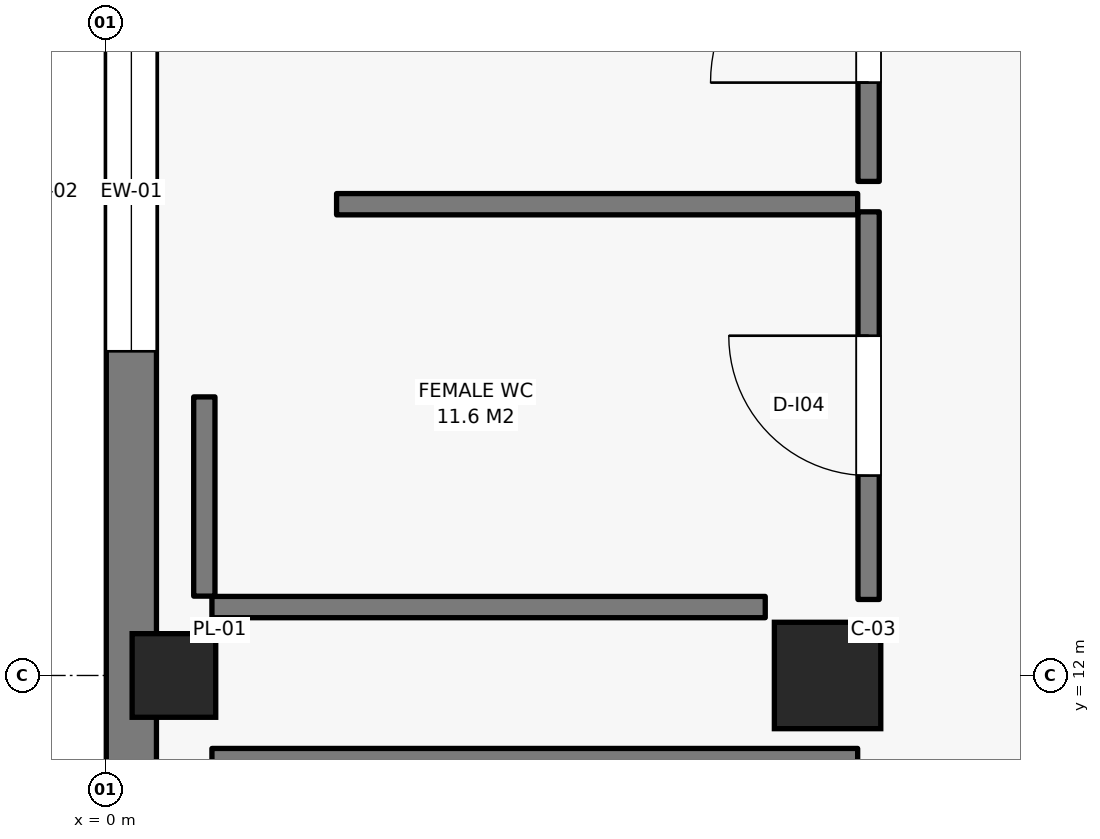
"""IFC4 building model, lengths in metres.
Left out: names, types, materials, properties, quantities, classifications, styles, units other than length and angle.
Written with IfcOpenShell. Run it as: python <this file> out.ifc"""

import sys

from ifc_helpers import new_model, si_unit, direction, frame, frame_2d, origin, origin_2d, place, context, subcontext, project, spatial, rectangle, extrude, element, fill, save


model = new_model("IFC4")
c1 = context("Model", 3, precision=1e-05, world=origin(), true_north=direction((0.0, 1.0)))
c2 = subcontext(c1, "Body", "Model", "MODEL_VIEW")
j1 = project(units=[si_unit("LENGTHUNIT", "METRE"), si_unit("PLANEANGLEUNIT", "RADIAN")], contexts=[c1])
p1 = place(None, origin())
s1 = spatial("IfcSite", under=j1, at=p1, CompositionType="ELEMENT")
p2 = place(p1, origin())
s2 = spatial("IfcBuilding", under=s1, at=p2, CompositionType="ELEMENT")
p3 = place(p2, origin())
s3 = spatial("IfcBuildingStorey", under=s2, at=p3, CompositionType="ELEMENT", Elevation=0.0)
p4 = place(p3, frame((0.45, 12.0, -0.4), z_axis=(0.0, 0.0, 1.0), x_axis=(1.0, 0.0, 0.0)))
e1 = element("IfcColumn", 1, at=p4, inside=s3, PredefinedType="PILASTER", context=c2, shape_type="SweptSolid", body=[
    extrude(rectangle(XDim=0.55, YDim=0.55, at=origin_2d()), origin(), (0.0, 0.0, 1.0), 6.4),
])
p5 = place(p3, frame((4.75, 12.0, -0.4), z_axis=(0.0, 0.0, 1.0), x_axis=(1.0, 0.0, 0.0)))
e2 = element("IfcColumn", 2, at=p5, inside=s3, PredefinedType="COLUMN", context=c2, shape_type="SweptSolid", body=[
    extrude(rectangle(XDim=0.7, YDim=0.7, at=origin_2d()), origin(), (0.0, 0.0, 1.0), 6.4),
])
p6 = place(p3, frame((0.17, 30.0, 0.0), z_axis=(0.0, 0.0, 1.0), x_axis=(0.0, -1.0, 0.0)))
e3 = element("IfcWall", 3, at=p6, inside=s3, PredefinedType="SOLIDWALL", context=c2, shape_type="SweptSolid", body=[
    extrude(rectangle(XDim=29.635, YDim=0.33, at=frame_2d((14.817, 0.0))), origin(), (0.0, 0.0, 1.0), 5.385),
])
p7 = place(p6, frame((1.067, 0.0, 0.82)))
e4 = element("IfcOpeningElement", 4, at=p7, cuts=e3, PredefinedType="OPENING", context=c2, shape_type="SweptSolid", body=[
    extrude(rectangle(XDim=2.1, YDim=2.55, at=frame_2d((1.05, 1.275))), frame((0.0, 0.175, 0.0), z_axis=(0.0, -1.0, 0.0), x_axis=(1.0, 0.0, 0.0)), (0.0, 0.0, 1.0), 0.35),
])
p8 = place(p6, frame((13.768, 0.0, 0.82)))
e5 = element("IfcOpeningElement", 5, at=p8, cuts=e3, PredefinedType="OPENING", context=c2, shape_type="SweptSolid", body=[
    extrude(rectangle(XDim=2.1, YDim=2.55, at=frame_2d((1.05, 1.275))), frame((0.0, 0.175, 0.0), z_axis=(0.0, -1.0, 0.0), x_axis=(1.0, 0.0, 0.0)), (0.0, 0.0, 1.0), 0.35),
])
p9 = place(p6, frame((26.468, 0.0, 0.82)))
e6 = element("IfcOpeningElement", 6, at=p9, cuts=e3, PredefinedType="OPENING", context=c2, shape_type="SweptSolid", body=[
    extrude(rectangle(XDim=2.1, YDim=2.55, at=frame_2d((1.05, 1.275))), frame((0.0, 0.175, 0.0), z_axis=(0.0, -1.0, 0.0), x_axis=(1.0, 0.0, 0.0)), (0.0, 0.0, 1.0), 0.35),
])
p10 = place(p3, frame((4.948, 11.45, 0.0), z_axis=(0.0, 0.0, 1.0), x_axis=(-1.0, 0.0, 0.0)))
e7 = element("IfcWall", 7, at=p10, inside=s3, PredefinedType="PARTITIONING", context=c2, shape_type="SweptSolid", body=[
    extrude(rectangle(XDim=4.248, YDim=0.14, at=frame_2d((2.124, 0.0))), origin(), (0.0, 0.0, 1.0), 5.345),
])
p11 = place(p3, frame((0.7, 12.45, 0.0), z_axis=(0.0, 0.0, 1.0), x_axis=(1.0, 0.0, 0.0)))
e8 = element("IfcWall", 8, at=p11, inside=s3, PredefinedType="PARTITIONING", context=c2, shape_type="SweptSolid", body=[
    extrude(rectangle(XDim=3.64, YDim=0.14, at=frame_2d((1.82, 0.0))), origin(), (0.0, 0.0, 1.0), 5.385),
])
p12 = place(p3, frame((5.02, 12.5, 0.0), z_axis=(0.0, 0.0, 1.0), x_axis=(0.0, 1.0, 0.0)))
e9 = element("IfcWall", 9, at=p12, inside=s3, PredefinedType="PARTITIONING", context=c2, shape_type="SweptSolid", body=[
    extrude(rectangle(XDim=2.55, YDim=0.14, at=frame_2d((1.275, 0.0))), origin(), (0.0, 0.0, 1.0), 5.345),
])
p13 = place(p12, frame((0.815, 0.0, 0.0)))
e10 = element("IfcOpeningElement", 10, at=p13, cuts=e9, PredefinedType="OPENING", context=c2, shape_type="SweptSolid", body=[
    extrude(rectangle(XDim=0.92, YDim=2.08, at=frame_2d((0.46, 1.04))), frame((0.0, 0.08, 0.0), z_axis=(0.0, -1.0, 0.0), x_axis=(1.0, 0.0, 0.0)), (0.0, 0.0, 1.0), 0.16),
])
p14 = place(p3, frame((4.948, 15.1, 0.0), z_axis=(0.0, 0.0, 1.0), x_axis=(-1.0, 0.0, 0.0)))
e11 = element("IfcWall", 11, at=p14, inside=s3, PredefinedType="PARTITIONING", context=c2, shape_type="SweptSolid", body=[
    extrude(rectangle(XDim=3.428, YDim=0.14, at=frame_2d((1.714, 0.0))), origin(), (0.0, 0.0, 1.0), 5.345),
])
p15 = place(p3, frame((0.65, 13.833, 0.0), z_axis=(0.0, 0.0, 1.0), x_axis=(0.0, -1.0, 0.0)))
e12 = element("IfcWall", 12, at=p15, inside=s3, PredefinedType="PARTITIONING", context=c2, shape_type="SweptSolid", body=[
    extrude(rectangle(XDim=1.311, YDim=0.14, at=frame_2d((0.655, 0.0))), origin(), (0.0, 0.0, 1.0), 5.385),
])
p16 = place(p3, frame((5.02, 15.25, 0.0), z_axis=(0.0, 0.0, 1.0), x_axis=(0.0, 1.0, 0.0)))
e13 = element("IfcWall", 13, at=p16, inside=s3, PredefinedType="PARTITIONING", context=c2, shape_type="SweptSolid", body=[
    extrude(rectangle(XDim=2.34, YDim=0.14, at=frame_2d((1.17, 0.0))), origin(), (0.0, 0.0, 1.0), 5.345),
])
p17 = place(p16, frame((0.65, 0.0, 0.0)))
e14 = element("IfcOpeningElement", 14, at=p17, cuts=e13, PredefinedType="OPENING", context=c2, shape_type="SweptSolid", body=[
    extrude(rectangle(XDim=1.04, YDim=2.1, at=frame_2d((0.52, 1.05))), frame((0.0, 0.08, 0.0), z_axis=(0.0, -1.0, 0.0), x_axis=(1.0, 0.0, 0.0)), (0.0, 0.0, 1.0), 0.16),
])
p18 = place(p8, origin())
e15 = element("IfcWindow", 15, at=p18, inside=s3, PartitioningType="SINGLE_PANEL", PredefinedType="WINDOW", context=c2, shape_type="SweptSolid", body=[
    extrude(rectangle(XDim=2.1, YDim=2.55, at=frame_2d((1.05, 1.275))), frame((0.0, 0.03, 0.0), z_axis=(0.0, -1.0, 0.0), x_axis=(1.0, 0.0, 0.0)), (0.0, 0.0, 1.0), 0.06),
])
fill(e5, e15)
p19 = place(p13, origin())
e16 = element("IfcDoor", 16, at=p19, inside=s3, OperationType="SINGLE_SWING_RIGHT", PredefinedType="DOOR", context=c2, shape_type="SweptSolid", body=[
    extrude(rectangle(XDim=0.92, YDim=2.08, at=frame_2d((0.46, 1.04))), frame((0.0, 0.025, 0.0), z_axis=(0.0, -1.0, 0.0), x_axis=(1.0, 0.0, 0.0)), (0.0, 0.0, 1.0), 0.05),
])
fill(e10, e16)
p20 = place(p17, origin())
e17 = element("IfcDoor", 17, at=p20, inside=s3, OperationType="SINGLE_SWING_LEFT", PredefinedType="DOOR", context=c2, shape_type="SweptSolid", body=[
    extrude(rectangle(XDim=1.04, YDim=2.1, at=frame_2d((0.52, 1.05))), frame((0.0, 0.025, 0.0), z_axis=(0.0, -1.0, 0.0), x_axis=(1.0, 0.0, 0.0)), (0.0, 0.0, 1.0), 0.05),
])
fill(e14, e17)
save(model, sys.argv[1])
